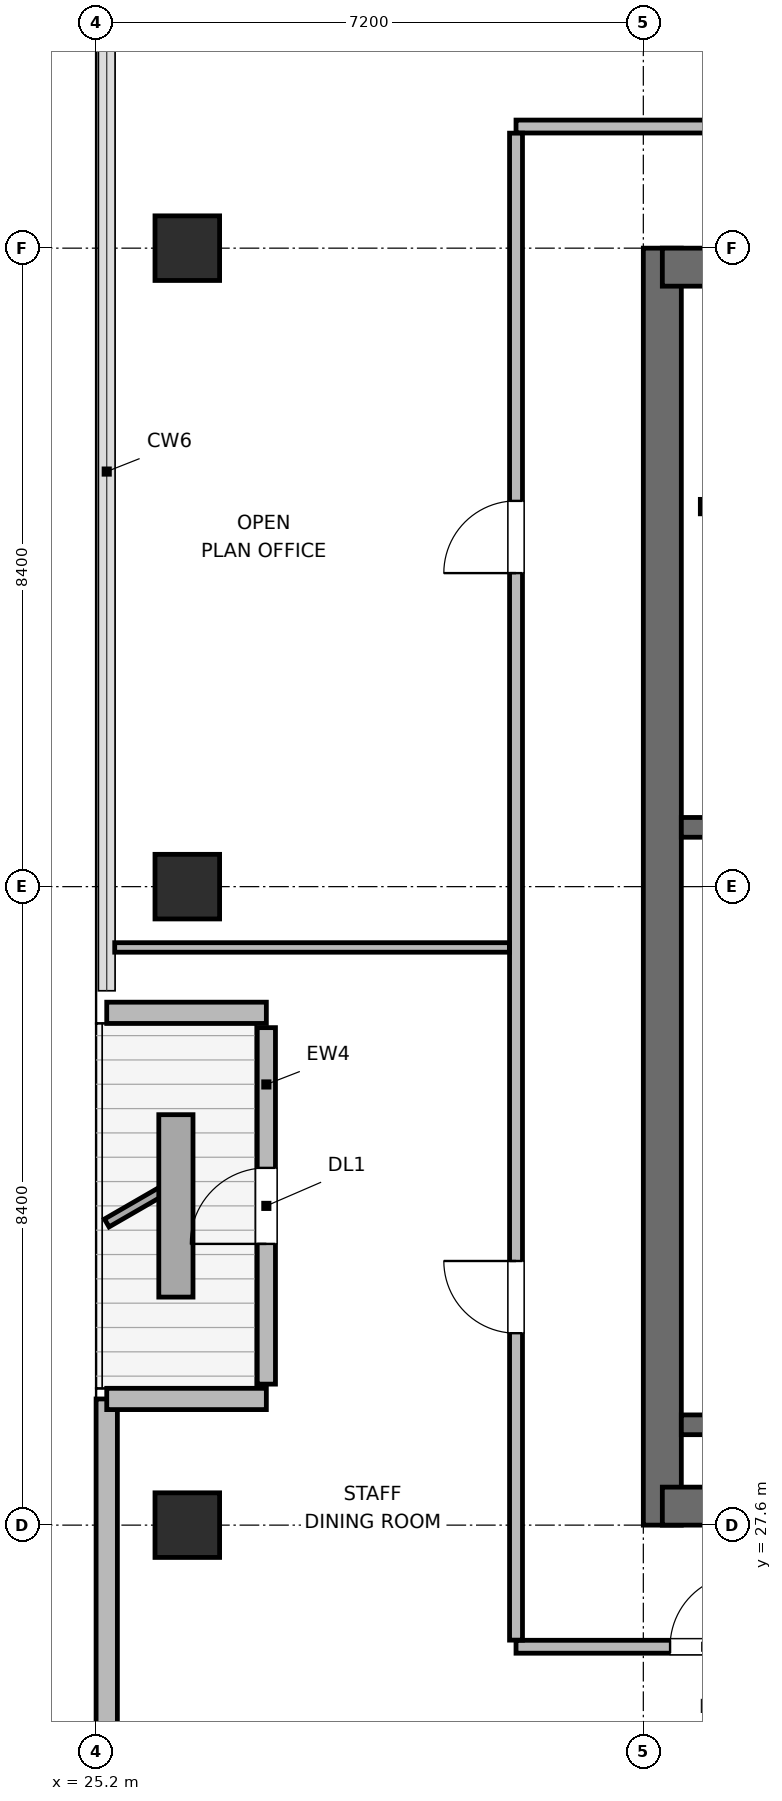
"""IFC4 building model, lengths in metres.
Left out: names, types, materials, properties, quantities, classifications, styles, units other than length and angle.
Written with IfcOpenShell. Run it as: python <this file> out.ifc"""

import sys

from ifc_helpers import new_model, si_unit, direction, frame, frame_2d, origin, origin_2d, place, context, subcontext, project, spatial, rectangle, extrude, element, fill, save


model = new_model("IFC4")
c1 = context("Model", 3, precision=1e-05, world=origin(), true_north=direction((0.0, 1.0)))
c2 = subcontext(c1, "Body", "Model", "MODEL_VIEW")
j1 = project(units=[si_unit("LENGTHUNIT", "METRE"), si_unit("PLANEANGLEUNIT", "RADIAN")], contexts=[c1])
p1 = place(None, origin())
s1 = spatial("IfcSite", under=j1, at=p1, CompositionType="ELEMENT")
p2 = place(p1, origin())
s2 = spatial("IfcBuilding", under=s1, at=p2, CompositionType="ELEMENT")
p3 = place(p2, frame((0.0, 0.0, 350.4)))
s3 = spatial("IfcBuildingStorey", under=s2, at=p3, CompositionType="ELEMENT", Elevation=350.4)
p4 = place(p3, frame((32.65, 27.6, 0.0), z_axis=(0.0, 0.0, 1.0), x_axis=(0.0, 1.0, 0.0)))
e1 = element("IfcWall", 1, at=p4, inside=s3, PredefinedType="SHEAR", context=c2, shape_type="SweptSolid", body=[
    extrude(rectangle(XDim=16.8, YDim=0.5, at=frame_2d((8.4, 0.0))), origin(), (0.0, 0.0, 1.0), 4.5),
])
p5 = place(p3, frame((32.65, 27.85, 0.0), z_axis=(0.0, 0.0, 1.0), x_axis=(1.0, 0.0, 0.0)))
e2 = element("IfcWall", 2, at=p5, inside=s3, PredefinedType="SHEAR", context=c2, shape_type="SweptSolid", body=[
    extrude(rectangle(XDim=9.5, YDim=0.5, at=frame_2d((4.75, 0.0))), origin(), (0.0, 0.0, 1.0), 4.5),
])
p6 = place(p5, frame((5.075, 0.0, 0.0)))
e3 = element("IfcOpeningElement", 3, at=p6, cuts=e2, PredefinedType="OPENING", context=c2, shape_type="SweptSolid", body=[
    extrude(rectangle(XDim=1.05, YDim=2.04, at=frame_2d((0.525, 1.02))), frame((0.0, 0.26, 0.0), z_axis=(0.0, -1.0, 0.0), x_axis=(1.0, 0.0, 0.0)), (0.0, 0.0, 1.0), 0.52),
])
p7 = place(p3, frame((32.65, 44.15, 0.0), z_axis=(0.0, 0.0, 1.0), x_axis=(1.0, 0.0, 0.0)))
e4 = element("IfcWall", 4, at=p7, inside=s3, PredefinedType="SHEAR", context=c2, shape_type="SweptSolid", body=[
    extrude(rectangle(XDim=9.5, YDim=0.5, at=frame_2d((4.75, 0.0))), origin(), (0.0, 0.0, 1.0), 4.5),
])
p8 = place(p7, frame((1.075, 0.0, 0.0)))
e5 = element("IfcOpeningElement", 5, at=p8, cuts=e4, PredefinedType="OPENING", context=c2, shape_type="SweptSolid", body=[
    extrude(rectangle(XDim=0.95, YDim=2.04, at=frame_2d((0.475, 1.02))), frame((0.0, 0.26, 0.0), z_axis=(0.0, -1.0, 0.0), x_axis=(1.0, 0.0, 0.0)), (0.0, 0.0, 1.0), 0.52),
])
p9 = place(p7, frame((4.325, 0.0, 0.0)))
e6 = element("IfcOpeningElement", 6, at=p9, cuts=e4, PredefinedType="OPENING", context=c2, shape_type="SweptSolid", body=[
    extrude(rectangle(XDim=0.9, YDim=2.02, at=frame_2d((0.45, 1.01))), frame((0.0, 0.26, 0.0), z_axis=(0.0, -1.0, 0.0), x_axis=(1.0, 0.0, 0.0)), (0.0, 0.0, 1.0), 0.52),
])
p10 = place(p7, frame((7.225, 0.0, 0.0)))
e7 = element("IfcOpeningElement", 7, at=p10, cuts=e4, PredefinedType="OPENING", context=c2, shape_type="SweptSolid", body=[
    extrude(rectangle(XDim=0.9, YDim=2.02, at=frame_2d((0.45, 1.01))), frame((0.0, 0.26, 0.0), z_axis=(0.0, -1.0, 0.0), x_axis=(1.0, 0.0, 0.0)), (0.0, 0.0, 1.0), 0.52),
])
for number, where, z_axis, x_axis in (
    (8, (32.9, 28.92, 0.0), (0.0, 0.0, 1.0), (1.0, 0.0, 0.0)),
    (9, (32.9, 36.78, 0.0), (0.0, 0.0, 1.0), (1.0, 0.0, 0.0)),
):
    element("IfcWall", number, at=place(p3, frame(where, z_axis=z_axis, x_axis=x_axis)), inside=s3, PredefinedType="SHEAR", context=c2, shape_type="SweptSolid", body=[
        extrude(rectangle(XDim=4.21, YDim=0.26, at=frame_2d((2.105, 0.0))), origin(), (0.0, 0.0, 1.0), 4.5),
    ])
for number, where, z_axis, x_axis in (
    (10, (26.4, 27.6, 0.0), (0.0, 0.0, 1.0), (1.0, 0.0, 0.0)),
    (11, (26.4, 36.0, 0.0), (0.0, 0.0, 1.0), (1.0, 0.0, 0.0)),
    (12, (26.4, 44.4, 0.0), (0.0, 0.0, 1.0), (1.0, 0.0, 0.0)),
):
    element("IfcColumn", number, at=place(p3, frame(where, z_axis=z_axis, x_axis=x_axis)), inside=s3, PredefinedType="COLUMN", context=c2, shape_type="SweptSolid", body=[
        extrude(rectangle(XDim=0.85, YDim=0.85, at=origin_2d()), origin(), (0.0, 0.0, 1.0), 4.5),
    ])
p11 = place(p3, frame((25.34, 23.418, 0.0), z_axis=(0.0, 0.0, 1.0), x_axis=(0.0, 1.0, 0.0)))
e13 = element("IfcWall", 13, at=p11, inside=s3, PredefinedType="SOLIDWALL", context=c2, shape_type="SweptSolid", body=[
    extrude(rectangle(XDim=5.842, YDim=0.28, at=frame_2d((2.921, 0.0))), origin(), (0.0, 0.0, 1.0), 4.2),
])
p12 = place(p3, frame((25.34, 29.26, 0.0), z_axis=(0.0, 0.0, 1.0), x_axis=(1.0, 0.0, 0.0)))
e14 = element("IfcWall", 14, at=p12, inside=s3, PredefinedType="SOLIDWALL", context=c2, shape_type="SweptSolid", body=[
    extrude(rectangle(XDim=2.1, YDim=0.28, at=frame_2d((1.05, 0.0))), origin(), (0.0, 0.0, 1.0), 2.695),
])
p13 = place(p3, frame((27.44, 29.455, 0.0), z_axis=(0.0, 0.0, 1.0), x_axis=(0.0, 1.0, 0.0)))
e15 = element("IfcWall", 15, at=p13, inside=s3, PredefinedType="SOLIDWALL", context=c2, shape_type="SweptSolid", body=[
    extrude(rectangle(XDim=4.69, YDim=0.24, at=frame_2d((2.345, 0.0))), origin(), (0.0, 0.0, 1.0), 3.791),
])
p14 = place(p13, frame((1.845, 0.0, 0.0)))
e16 = element("IfcOpeningElement", 16, at=p14, cuts=e15, PredefinedType="OPENING", context=c2, shape_type="SweptSolid", body=[
    extrude(rectangle(XDim=1.0, YDim=2.02, at=frame_2d((0.5, 1.01))), frame((0.0, 0.13, 0.0), z_axis=(0.0, -1.0, 0.0), x_axis=(1.0, 0.0, 0.0)), (0.0, 0.0, 1.0), 0.26),
])
p15 = place(p3, frame((27.44, 34.34, 0.0), z_axis=(0.0, 0.0, 1.0), x_axis=(-1.0, 0.0, 0.0)))
e17 = element("IfcWall", 17, at=p15, inside=s3, PredefinedType="SOLIDWALL", context=c2, shape_type="SweptSolid", body=[
    extrude(rectangle(XDim=2.1, YDim=0.28, at=frame_2d((1.05, 0.0))), origin(), (0.0, 0.0, 1.0), 2.695),
])
p16 = place(p3, frame((33.15, 41.0, 0.0), z_axis=(0.0, 0.0, 1.0), x_axis=(1.0, 0.0, 0.0)))
e18 = element("IfcWall", 18, at=p16, inside=s3, PredefinedType="PLUMBINGWALL", context=c2, shape_type="SweptSolid", body=[
    extrude(rectangle(XDim=8.5, YDim=0.19, at=frame_2d((4.25, 0.0))), origin(), (0.0, 0.0, 1.0), 4.2),
])
p17 = place(p3, frame((30.725, 26.0, 0.0), z_axis=(0.0, 0.0, 1.0), x_axis=(1.0, 0.0, 0.0)))
e19 = element("IfcWall", 19, at=p17, inside=s3, PredefinedType="PARTITIONING", context=c2, shape_type="SweptSolid", body=[
    extrude(rectangle(XDim=32.875, YDim=0.17, at=frame_2d((16.438, 0.0))), origin(), (0.0, 0.0, 1.0), 4.2),
])
p18 = place(p17, frame((2.027, 0.0, 0.0)))
e20 = element("IfcOpeningElement", 20, at=p18, cuts=e19, PredefinedType="OPENING", context=c2, shape_type="SweptSolid", body=[
    extrude(rectangle(XDim=0.95, YDim=2.04, at=frame_2d((0.475, 1.02))), frame((0.0, 0.095, 0.0), z_axis=(0.0, -1.0, 0.0), x_axis=(1.0, 0.0, 0.0)), (0.0, 0.0, 1.0), 0.19),
])
p19 = place(p17, frame((6.435, 0.0, 0.0)))
e21 = element("IfcOpeningElement", 21, at=p19, cuts=e19, PredefinedType="OPENING", context=c2, shape_type="SweptSolid", body=[
    extrude(rectangle(XDim=0.95, YDim=2.04, at=frame_2d((0.475, 1.02))), frame((0.0, 0.095, 0.0), z_axis=(0.0, -1.0, 0.0), x_axis=(1.0, 0.0, 0.0)), (0.0, 0.0, 1.0), 0.19),
])
p20 = place(p17, frame((10.245, 0.0, 0.0)))
e22 = element("IfcOpeningElement", 22, at=p20, cuts=e19, PredefinedType="OPENING", context=c2, shape_type="SweptSolid", body=[
    extrude(rectangle(XDim=0.95, YDim=2.04, at=frame_2d((0.475, 1.02))), frame((0.0, 0.095, 0.0), z_axis=(0.0, -1.0, 0.0), x_axis=(1.0, 0.0, 0.0)), (0.0, 0.0, 1.0), 0.19),
])
p21 = place(p17, frame((14.055, 0.0, 0.0)))
e23 = element("IfcOpeningElement", 23, at=p21, cuts=e19, PredefinedType="OPENING", context=c2, shape_type="SweptSolid", body=[
    extrude(rectangle(XDim=0.95, YDim=2.04, at=frame_2d((0.475, 1.02))), frame((0.0, 0.095, 0.0), z_axis=(0.0, -1.0, 0.0), x_axis=(1.0, 0.0, 0.0)), (0.0, 0.0, 1.0), 0.19),
])
p22 = place(p17, frame((17.865, 0.0, 0.0)))
e24 = element("IfcOpeningElement", 24, at=p22, cuts=e19, PredefinedType="OPENING", context=c2, shape_type="SweptSolid", body=[
    extrude(rectangle(XDim=0.95, YDim=2.04, at=frame_2d((0.475, 1.02))), frame((0.0, 0.095, 0.0), z_axis=(0.0, -1.0, 0.0), x_axis=(1.0, 0.0, 0.0)), (0.0, 0.0, 1.0), 0.19),
])
p23 = place(p17, frame((21.675, 0.0, 0.0)))
e25 = element("IfcOpeningElement", 25, at=p23, cuts=e19, PredefinedType="OPENING", context=c2, shape_type="SweptSolid", body=[
    extrude(rectangle(XDim=0.95, YDim=2.04, at=frame_2d((0.475, 1.02))), frame((0.0, 0.095, 0.0), z_axis=(0.0, -1.0, 0.0), x_axis=(1.0, 0.0, 0.0)), (0.0, 0.0, 1.0), 0.19),
])
p24 = place(p17, frame((25.485, 0.0, 0.0)))
e26 = element("IfcOpeningElement", 26, at=p24, cuts=e19, PredefinedType="OPENING", context=c2, shape_type="SweptSolid", body=[
    extrude(rectangle(XDim=0.95, YDim=2.04, at=frame_2d((0.475, 1.02))), frame((0.0, 0.095, 0.0), z_axis=(0.0, -1.0, 0.0), x_axis=(1.0, 0.0, 0.0)), (0.0, 0.0, 1.0), 0.19),
])
p25 = place(p17, frame((29.895, 0.0, 0.0)))
e27 = element("IfcOpeningElement", 27, at=p25, cuts=e19, PredefinedType="OPENING", context=c2, shape_type="SweptSolid", body=[
    extrude(rectangle(XDim=0.95, YDim=2.04, at=frame_2d((0.475, 1.02))), frame((0.0, 0.095, 0.0), z_axis=(0.0, -1.0, 0.0), x_axis=(1.0, 0.0, 0.0)), (0.0, 0.0, 1.0), 0.19),
])
p26 = place(p3, frame((30.725, 46.0, 0.0), z_axis=(0.0, 0.0, 1.0), x_axis=(1.0, 0.0, 0.0)))
e28 = element("IfcWall", 28, at=p26, inside=s3, PredefinedType="PARTITIONING", context=c2, shape_type="SweptSolid", body=[
    extrude(rectangle(XDim=32.875, YDim=0.17, at=frame_2d((16.438, 0.0))), origin(), (0.0, 0.0, 1.0), 4.2),
])
p27 = place(p26, frame((3.487, 0.0, 0.0)))
e29 = element("IfcOpeningElement", 29, at=p27, cuts=e28, PredefinedType="OPENING", context=c2, shape_type="SweptSolid", body=[
    extrude(rectangle(XDim=0.95, YDim=2.04, at=frame_2d((0.475, 1.02))), frame((0.0, 0.095, 0.0), z_axis=(0.0, -1.0, 0.0), x_axis=(1.0, 0.0, 0.0)), (0.0, 0.0, 1.0), 0.19),
])
p28 = place(p26, frame((8.685, 0.0, 0.0)))
e30 = element("IfcOpeningElement", 30, at=p28, cuts=e28, PredefinedType="OPENING", context=c2, shape_type="SweptSolid", body=[
    extrude(rectangle(XDim=0.95, YDim=2.04, at=frame_2d((0.475, 1.02))), frame((0.0, 0.095, 0.0), z_axis=(0.0, -1.0, 0.0), x_axis=(1.0, 0.0, 0.0)), (0.0, 0.0, 1.0), 0.19),
])
p29 = place(p26, frame((13.835, 0.0, 0.0)))
e31 = element("IfcOpeningElement", 31, at=p29, cuts=e28, PredefinedType="OPENING", context=c2, shape_type="SweptSolid", body=[
    extrude(rectangle(XDim=0.95, YDim=2.04, at=frame_2d((0.475, 1.02))), frame((0.0, 0.095, 0.0), z_axis=(0.0, -1.0, 0.0), x_axis=(1.0, 0.0, 0.0)), (0.0, 0.0, 1.0), 0.19),
])
p30 = place(p26, frame((20.22, 0.0, 0.0)))
e32 = element("IfcOpeningElement", 32, at=p30, cuts=e28, PredefinedType="OPENING", context=c2, shape_type="SweptSolid", body=[
    extrude(rectangle(XDim=0.95, YDim=2.04, at=frame_2d((0.475, 1.02))), frame((0.0, 0.095, 0.0), z_axis=(0.0, -1.0, 0.0), x_axis=(1.0, 0.0, 0.0)), (0.0, 0.0, 1.0), 0.19),
])
p31 = place(p26, frame((25.71, 0.0, 0.0)))
e33 = element("IfcOpeningElement", 33, at=p31, cuts=e28, PredefinedType="OPENING", context=c2, shape_type="SweptSolid", body=[
    extrude(rectangle(XDim=0.95, YDim=2.04, at=frame_2d((0.475, 1.02))), frame((0.0, 0.095, 0.0), z_axis=(0.0, -1.0, 0.0), x_axis=(1.0, 0.0, 0.0)), (0.0, 0.0, 1.0), 0.19),
])
p32 = place(p26, frame((30.565, 0.0, 0.0)))
e34 = element("IfcOpeningElement", 34, at=p32, cuts=e28, PredefinedType="OPENING", context=c2, shape_type="SweptSolid", body=[
    extrude(rectangle(XDim=0.95, YDim=2.04, at=frame_2d((0.475, 1.02))), frame((0.0, 0.095, 0.0), z_axis=(0.0, -1.0, 0.0), x_axis=(1.0, 0.0, 0.0)), (0.0, 0.0, 1.0), 0.19),
])
p33 = place(p3, frame((30.725, 26.087, 0.0), z_axis=(0.0, 0.0, 1.0), x_axis=(0.0, 1.0, 0.0)))
e35 = element("IfcWall", 35, at=p33, inside=s3, PredefinedType="PARTITIONING", context=c2, shape_type="SweptSolid", body=[
    extrude(rectangle(XDim=19.826, YDim=0.17, at=frame_2d((9.913, 0.0))), origin(), (0.0, 0.0, 1.0), 4.2),
])
p34 = place(p33, frame((4.038, 0.0, 0.0)))
e36 = element("IfcOpeningElement", 36, at=p34, cuts=e35, PredefinedType="OPENING", context=c2, shape_type="SweptSolid", body=[
    extrude(rectangle(XDim=0.95, YDim=2.04, at=frame_2d((0.475, 1.02))), frame((0.0, 0.095, 0.0), z_axis=(0.0, -1.0, 0.0), x_axis=(1.0, 0.0, 0.0)), (0.0, 0.0, 1.0), 0.19),
])
p35 = place(p33, frame((14.038, 0.0, 0.0)))
e37 = element("IfcOpeningElement", 37, at=p35, cuts=e35, PredefinedType="OPENING", context=c2, shape_type="SweptSolid", body=[
    extrude(rectangle(XDim=0.95, YDim=2.04, at=frame_2d((0.475, 1.02))), frame((0.0, 0.095, 0.0), z_axis=(0.0, -1.0, 0.0), x_axis=(1.0, 0.0, 0.0)), (0.0, 0.0, 1.0), 0.19),
])
p36 = place(p3, frame((25.445, 35.2, 0.0), z_axis=(0.0, 0.0, 1.0), x_axis=(1.0, 0.0, 0.0)))
e38 = element("IfcWall", 38, at=p36, inside=s3, PredefinedType="PARTITIONING", context=c2, shape_type="SweptSolid", body=[
    extrude(rectangle(XDim=5.193, YDim=0.125, at=frame_2d((2.596, 0.0))), origin(), (0.0, 0.0, 1.0), 4.2),
])
p37 = place(p14, origin())
e39 = element("IfcDoor", 39, at=p37, inside=s3, OperationType="SINGLE_SWING_LEFT", PredefinedType="DOOR", context=c2, shape_type="SweptSolid", body=[
    extrude(rectangle(XDim=1.0, YDim=2.02, at=frame_2d((0.5, 1.01))), frame((0.0, 0.025, 0.0), z_axis=(0.0, -1.0, 0.0), x_axis=(1.0, 0.0, 0.0)), (0.0, 0.0, 1.0), 0.05),
])
fill(e16, e39)
p38 = place(p18, origin())
e40 = element("IfcDoor", 40, at=p38, inside=s3, OperationType="SINGLE_SWING_RIGHT", PredefinedType="DOOR", context=c2, shape_type="SweptSolid", body=[
    extrude(rectangle(XDim=0.95, YDim=2.04, at=frame_2d((0.475, 1.02))), frame((0.0, 0.025, 0.0), z_axis=(0.0, -1.0, 0.0), x_axis=(1.0, 0.0, 0.0)), (0.0, 0.0, 1.0), 0.05),
])
fill(e20, e40)
p39 = place(p34, origin())
e41 = element("IfcDoor", 41, at=p39, inside=s3, OperationType="SINGLE_SWING_RIGHT", PredefinedType="DOOR", context=c2, shape_type="SweptSolid", body=[
    extrude(rectangle(XDim=0.95, YDim=2.04, at=frame_2d((0.475, 1.02))), frame((0.0, 0.025, 0.0), z_axis=(0.0, -1.0, 0.0), x_axis=(1.0, 0.0, 0.0)), (0.0, 0.0, 1.0), 0.05),
])
fill(e36, e41)
p40 = place(p35, origin())
e42 = element("IfcDoor", 42, at=p40, inside=s3, OperationType="SINGLE_SWING_LEFT", PredefinedType="DOOR", context=c2, shape_type="SweptSolid", body=[
    extrude(rectangle(XDim=0.95, YDim=2.04, at=frame_2d((0.475, 1.02))), frame((0.0, 0.025, 0.0), z_axis=(0.0, -1.0, 0.0), x_axis=(1.0, 0.0, 0.0)), (0.0, 0.0, 1.0), 0.05),
])
fill(e37, e42)
save(model, sys.argv[1])
